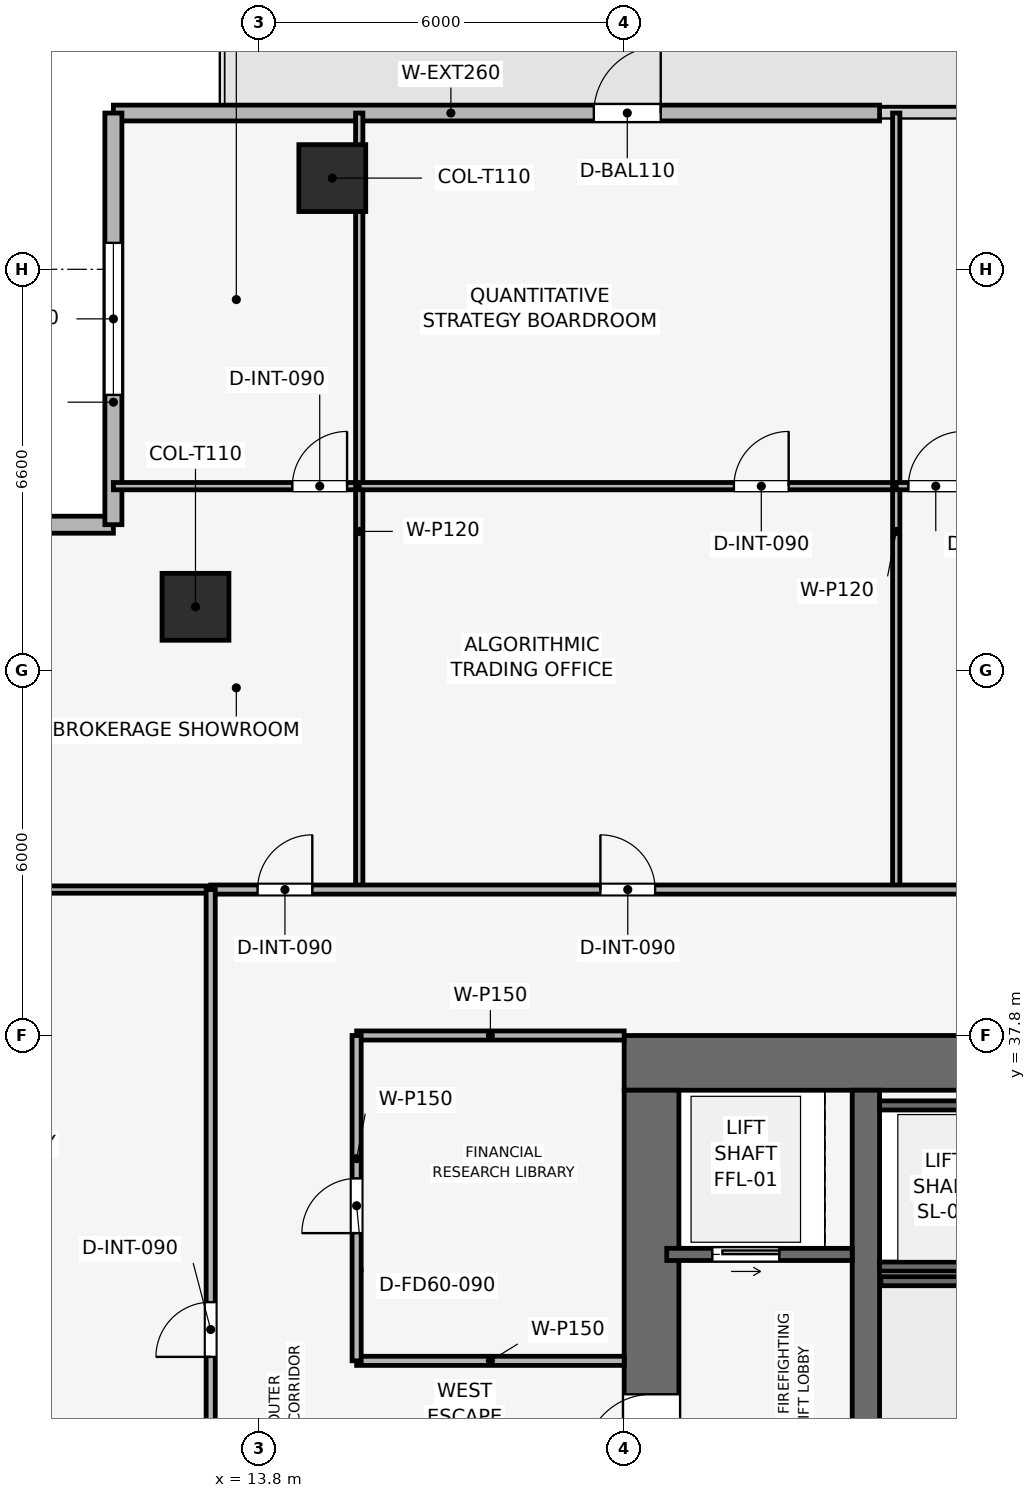
"""IFC4 building model, lengths in metres.
Left out: names, types, materials, properties, quantities, classifications, styles, units other than length and angle.
Written with IfcOpenShell. Run it as: python <this file> out.ifc"""

import sys

from ifc_helpers import new_model, si_unit, direction, frame, frame_2d, origin, origin_2d, place, context, subcontext, project, spatial, rectangle, extrude, element, fill, save


model = new_model("IFC4")
c1 = context("Model", 3, precision=1e-05, world=origin(), true_north=direction((0.0, 1.0)))
c2 = subcontext(c1, "Body", "Model", "MODEL_VIEW")
j1 = project(units=[si_unit("LENGTHUNIT", "METRE"), si_unit("PLANEANGLEUNIT", "RADIAN")], contexts=[c1])
p1 = place(None, origin())
s1 = spatial("IfcSite", under=j1, at=p1, CompositionType="ELEMENT")
p2 = place(p1, origin())
s2 = spatial("IfcBuilding", under=s1, at=p2, CompositionType="ELEMENT")
p3 = place(p2, frame((0.0, 0.0, 164.55)))
s3 = spatial("IfcBuildingStorey", under=s2, at=p3, CompositionType="ELEMENT", Elevation=164.55)
p4 = place(p3, frame((19.8, 37.35, 0.0), z_axis=(0.0, 0.0, 1.0), x_axis=(1.0, 0.0, 0.0)))
e1 = element("IfcWall", 1, at=p4, inside=s3, PredefinedType="SHEAR", context=c2, shape_type="SweptSolid", body=[
    extrude(rectangle(XDim=18.0, YDim=0.9, at=frame_2d((9.0, 0.0))), origin(), (0.0, 0.0, 1.0), 3.75),
])
p5 = place(p4, frame((7.05, 0.0, 0.0)))
e2 = element("IfcOpeningElement", 2, at=p5, cuts=e1, PredefinedType="OPENING", context=c2, shape_type="SweptSolid", body=[
    extrude(rectangle(XDim=1.1, YDim=2.15, at=frame_2d((0.55, 1.075))), frame((0.0, 0.46, 0.0), z_axis=(0.0, -1.0, 0.0), x_axis=(1.0, 0.0, 0.0)), (0.0, 0.0, 1.0), 0.92),
])
p6 = place(p3, frame((20.25, 20.7, 0.0), z_axis=(0.0, 0.0, 1.0), x_axis=(0.0, 1.0, 0.0)))
e3 = element("IfcWall", 3, at=p6, inside=s3, PredefinedType="SHEAR", context=c2, shape_type="SweptSolid", body=[
    extrude(rectangle(XDim=16.2, YDim=0.9, at=frame_2d((8.1, 0.0))), origin(), (0.0, 0.0, 1.0), 3.75),
])
p7 = place(p6, frame((10.1, 0.0, 0.0)))
e4 = element("IfcOpeningElement", 4, at=p7, cuts=e3, PredefinedType="OPENING", context=c2, shape_type="SweptSolid", body=[
    extrude(rectangle(XDim=1.1, YDim=2.15, at=frame_2d((0.55, 1.075))), frame((0.0, 0.46, 0.0), z_axis=(0.0, -1.0, 0.0), x_axis=(1.0, 0.0, 0.0)), (0.0, 0.0, 1.0), 0.92),
])
p8 = place(p3, frame((23.775, 20.7, 0.0), z_axis=(0.0, 0.0, 1.0), x_axis=(0.0, 1.0, 0.0)))
e5 = element("IfcWall", 5, at=p8, inside=s3, PredefinedType="SHEAR", context=c2, shape_type="SweptSolid", body=[
    extrude(rectangle(XDim=16.2, YDim=0.45, at=frame_2d((8.1, 0.0))), origin(), (0.0, 0.0, 1.0), 3.75),
])
for number, where, z_axis, x_axis in (
    (6, (15.0, 51.9, 0.003), (0.0, 0.0, 1.0), (1.0, 0.0, 0.0)),
    (7, (12.75, 44.85, 0.003), (0.0, 0.0, 1.0), (1.0, 0.0, 0.0)),
):
    element("IfcColumn", number, at=place(p3, frame(where, z_axis=z_axis, x_axis=x_axis)), inside=s3, PredefinedType="COLUMN", context=c2, shape_type="SweptSolid", body=[
        extrude(rectangle(XDim=1.1, YDim=1.1, at=origin_2d()), origin(), (0.0, 0.0, 1.0), 3.489),
    ])
p9 = place(p3, frame((11.4, 52.97, 0.0), z_axis=(0.0, 0.0, 1.0), x_axis=(1.0, 0.0, 0.0)))
e8 = element("IfcWall", 8, at=p9, inside=s3, PredefinedType="SOLIDWALL", context=c2, shape_type="SweptSolid", body=[
    extrude(rectangle(XDim=12.6, YDim=0.26, at=frame_2d((6.3, 0.0))), origin(), (0.0, 0.0, 1.0), 3.495),
])
p10 = place(p9, frame((7.901, 0.0, 0.0)))
e9 = element("IfcOpeningElement", 9, at=p10, cuts=e8, PredefinedType="OPENING", context=c2, shape_type="SweptSolid", body=[
    extrude(rectangle(XDim=1.1, YDim=2.2, at=frame_2d((0.55, 1.1))), frame((0.0, 0.14, 0.0), z_axis=(0.0, -1.0, 0.0), x_axis=(1.0, 0.0, 0.0)), (0.0, 0.0, 1.0), 0.28),
])
p11 = place(p3, frame((4.63, 46.2, 0.0), z_axis=(0.0, 0.0, 1.0), x_axis=(1.0, 0.0, 0.0)))
e10 = element("IfcWall", 10, at=p11, inside=s3, PredefinedType="SOLIDWALL", context=c2, shape_type="SweptSolid", body=[
    extrude(rectangle(XDim=6.77, YDim=0.28, at=frame_2d((3.385, 0.0))), origin(), (0.0, 0.0, 1.0), 3.495),
])
p12 = place(p11, frame((2.135, 0.0, 0.9)))
e11 = element("IfcOpeningElement", 11, at=p12, cuts=e10, PredefinedType="OPENING", context=c2, shape_type="SweptSolid", body=[
    extrude(rectangle(XDim=2.5, YDim=1.9, at=frame_2d((1.25, 0.95))), frame((0.0, 0.15, 0.0), z_axis=(0.0, -1.0, 0.0), x_axis=(1.0, 0.0, 0.0)), (0.0, 0.0, 1.0), 0.3),
])
p13 = place(p3, frame((11.4, 46.2, 0.0), z_axis=(0.0, 0.0, 1.0), x_axis=(0.0, 1.0, 0.0)))
e12 = element("IfcWall", 12, at=p13, inside=s3, PredefinedType="SOLIDWALL", context=c2, shape_type="SweptSolid", body=[
    extrude(rectangle(XDim=6.77, YDim=0.28, at=frame_2d((3.385, 0.0))), origin(), (0.0, 0.0, 1.0), 3.495),
])
p14 = place(p13, frame((2.135, 0.0, 0.9)))
e13 = element("IfcOpeningElement", 13, at=p14, cuts=e12, PredefinedType="OPENING", context=c2, shape_type="SweptSolid", body=[
    extrude(rectangle(XDim=2.5, YDim=1.9, at=frame_2d((1.25, 0.95))), frame((0.0, 0.15, 0.0), z_axis=(0.0, -1.0, 0.0), x_axis=(1.0, 0.0, 0.0)), (0.0, 0.0, 1.0), 0.3),
])
p15 = place(p3, frame((20.5, 34.2, 0.0), z_axis=(0.0, 0.0, 1.0), x_axis=(1.0, 0.0, 0.0)))
e14 = element("IfcWall", 14, at=p15, inside=s3, PredefinedType="SHEAR", context=c2, shape_type="SweptSolid", body=[
    extrude(rectangle(XDim=3.05, YDim=0.2, at=frame_2d((1.525, 0.0))), origin(), (0.0, 0.0, 1.0), 3.495),
])
p16 = place(p15, frame((0.75, 0.0, 0.0)))
e15 = element("IfcOpeningElement", 15, at=p16, cuts=e14, PredefinedType="OPENING", context=c2, shape_type="SweptSolid", body=[
    extrude(rectangle(XDim=1.1, YDim=2.15, at=frame_2d((0.55, 1.075))), frame((0.0, 0.11, 0.0), z_axis=(0.0, -1.0, 0.0), x_axis=(1.0, 0.0, 0.0)), (0.0, 0.0, 1.0), 0.22),
])
for number, where, z_axis, x_axis in (
    (16, (24.0, 34.0, 0.0), (0.0, 0.0, 1.0), (1.0, 0.0, 0.0)),
    (17, (24.0, 36.65, 0.0), (0.0, 0.0, 1.0), (1.0, 0.0, 0.0)),
):
    element("IfcWall", number, at=place(p3, frame(where, z_axis=z_axis, x_axis=x_axis)), inside=s3, PredefinedType="SHEAR", context=c2, shape_type="SweptSolid", body=[
        extrude(rectangle(XDim=2.48, YDim=0.15, at=frame_2d((1.24, 0.0))), origin(), (0.0, 0.0, 1.0), 3.495),
    ])
p17 = place(p3, frame((24.02, 33.76, 0.0), z_axis=(0.0, 0.0, 1.0), x_axis=(1.0, 0.0, 0.0)))
e18 = element("IfcWall", 18, at=p17, inside=s3, PredefinedType="SHEAR", context=c2, shape_type="SweptSolid", body=[
    extrude(rectangle(XDim=4.08, YDim=0.15, at=frame_2d((2.04, 0.0))), origin(), (0.0, 0.0, 1.0), 3.495),
])
p18 = place(p3, frame((15.4, 32.45, 0.0), z_axis=(0.0, 0.0, 1.0), x_axis=(1.0, 0.0, 0.0)))
e19 = element("IfcWall", 19, at=p18, inside=s3, PredefinedType="PARTITIONING", context=c2, shape_type="SweptSolid", body=[
    extrude(rectangle(XDim=4.4, YDim=0.15, at=frame_2d((2.2, 0.0))), origin(), (0.0, 0.0, 1.0), 3.495),
])
p19 = place(p3, frame((15.4, 37.8, 0.0), z_axis=(0.0, 0.0, 1.0), x_axis=(1.0, 0.0, 0.0)))
e20 = element("IfcWall", 20, at=p19, inside=s3, PredefinedType="PARTITIONING", context=c2, shape_type="SweptSolid", body=[
    extrude(rectangle(XDim=4.4, YDim=0.15, at=frame_2d((2.2, 0.0))), origin(), (0.0, 0.0, 1.0), 3.03),
])
p20 = place(p3, frame((15.4, 32.45, 0.0), z_axis=(0.0, 0.0, 1.0), x_axis=(0.0, 1.0, 0.0)))
e21 = element("IfcWall", 21, at=p20, inside=s3, PredefinedType="PARTITIONING", context=c2, shape_type="SweptSolid", body=[
    extrude(rectangle(XDim=5.35, YDim=0.15, at=frame_2d((2.675, 0.0))), origin(), (0.0, 0.0, 1.0), 3.03),
])
p21 = place(p20, frame((2.1, 0.0, 0.0)))
e22 = element("IfcOpeningElement", 22, at=p21, cuts=e21, PredefinedType="OPENING", context=c2, shape_type="SweptSolid", body=[
    extrude(rectangle(XDim=0.9, YDim=2.1, at=frame_2d((0.45, 1.05))), frame((0.0, 0.085, 0.0), z_axis=(0.0, -1.0, 0.0), x_axis=(1.0, 0.0, 0.0)), (0.0, 0.0, 1.0), 0.17),
])
p22 = place(p3, frame((11.4, 46.834, 0.0), z_axis=(0.0, 0.0, 1.0), x_axis=(1.0, 0.0, 0.0)))
e23 = element("IfcWall", 23, at=p22, inside=s3, PredefinedType="PARTITIONING", context=c2, shape_type="SweptSolid", body=[
    extrude(rectangle(XDim=4.043, YDim=0.12, at=frame_2d((2.021, 0.0))), origin(), (0.0, 0.0, 1.0), 2.98),
])
p23 = place(p22, frame((2.943, 0.0, 0.0)))
e24 = element("IfcOpeningElement", 24, at=p23, cuts=e23, PredefinedType="OPENING", context=c2, shape_type="SweptSolid", body=[
    extrude(rectangle(XDim=0.9, YDim=2.1, at=frame_2d((0.45, 1.05))), frame((0.0, 0.07, 0.0), z_axis=(0.0, -1.0, 0.0), x_axis=(1.0, 0.0, 0.0)), (0.0, 0.0, 1.0), 0.14),
])
p24 = place(p3, frame((15.443, 40.2, 0.0), z_axis=(0.0, 0.0, 1.0), x_axis=(0.0, 1.0, 0.0)))
e25 = element("IfcWall", 25, at=p24, inside=s3, PredefinedType="PARTITIONING", context=c2, shape_type="SweptSolid", body=[
    extrude(rectangle(XDim=12.77, YDim=0.12, at=frame_2d((6.385, 0.0))), origin(), (0.0, 0.0, 1.0), 2.98),
])
p25 = place(p3, frame((15.443, 46.834, 0.0), z_axis=(0.0, 0.0, 1.0), x_axis=(1.0, 0.0, 0.0)))
e26 = element("IfcWall", 26, at=p25, inside=s3, PredefinedType="PARTITIONING", context=c2, shape_type="SweptSolid", body=[
    extrude(rectangle(XDim=8.831, YDim=0.12, at=frame_2d((4.416, 0.0))), origin(), (0.0, 0.0, 1.0), 3.03),
])
p26 = place(p25, frame((6.162, 0.0, 0.0)))
e27 = element("IfcOpeningElement", 27, at=p26, cuts=e26, PredefinedType="OPENING", context=c2, shape_type="SweptSolid", body=[
    extrude(rectangle(XDim=0.9, YDim=2.1, at=frame_2d((0.45, 1.05))), frame((0.0, 0.07, 0.0), z_axis=(0.0, -1.0, 0.0), x_axis=(1.0, 0.0, 0.0)), (0.0, 0.0, 1.0), 0.14),
])
p27 = place(p3, frame((24.274, 40.2, 0.0), z_axis=(0.0, 0.0, 1.0), x_axis=(0.0, 1.0, 0.0)))
e28 = element("IfcWall", 28, at=p27, inside=s3, PredefinedType="PARTITIONING", context=c2, shape_type="SweptSolid", body=[
    extrude(rectangle(XDim=12.77, YDim=0.12, at=frame_2d((6.385, 0.0))), origin(), (0.0, 0.0, 1.0), 2.98),
])
p28 = place(p3, frame((24.274, 46.834, 0.0), z_axis=(0.0, 0.0, 1.0), x_axis=(1.0, 0.0, 0.0)))
e29 = element("IfcWall", 29, at=p28, inside=s3, PredefinedType="PARTITIONING", context=c2, shape_type="SweptSolid", body=[
    extrude(rectangle(XDim=8.831, YDim=0.12, at=frame_2d((4.416, 0.0))), origin(), (0.0, 0.0, 1.0), 3.03),
])
p29 = place(p28, frame((0.2, 0.0, 0.0)))
e30 = element("IfcOpeningElement", 30, at=p29, cuts=e29, PredefinedType="OPENING", context=c2, shape_type="SweptSolid", body=[
    extrude(rectangle(XDim=0.9, YDim=2.1, at=frame_2d((0.45, 1.05))), frame((0.0, 0.07, 0.0), z_axis=(0.0, -1.0, 0.0), x_axis=(1.0, 0.0, 0.0)), (0.0, 0.0, 1.0), 0.14),
])
p30 = place(p3, frame((4.63, 40.2, 0.0), z_axis=(0.0, 0.0, 1.0), x_axis=(1.0, 0.0, 0.0)))
e31 = element("IfcWall", 31, at=p30, inside=s3, PredefinedType="PARTITIONING", context=c2, shape_type="SweptSolid", body=[
    extrude(rectangle(XDim=8.37, YDim=0.12, at=frame_2d((4.185, 0.0))), origin(), (0.0, 0.0, 1.0), 2.98),
])
p31 = place(p3, frame((13.0, 40.2, 0.0), z_axis=(0.0, 0.0, 1.0), x_axis=(1.0, 0.0, 0.0)))
e32 = element("IfcWall", 32, at=p31, inside=s3, PredefinedType="PARTITIONING", context=c2, shape_type="SweptSolid", body=[
    extrude(rectangle(XDim=31.6, YDim=0.15, at=frame_2d((15.8, 0.0))), origin(), (0.0, 0.0, 1.0), 3.03),
])
p32 = place(p31, frame((0.771, 0.0, 0.0)))
e33 = element("IfcOpeningElement", 33, at=p32, cuts=e32, PredefinedType="OPENING", context=c2, shape_type="SweptSolid", body=[
    extrude(rectangle(XDim=0.9, YDim=2.1, at=frame_2d((0.45, 1.05))), frame((0.0, 0.085, 0.0), z_axis=(0.0, -1.0, 0.0), x_axis=(1.0, 0.0, 0.0)), (0.0, 0.0, 1.0), 0.17),
])
p33 = place(p31, frame((6.409, 0.0, 0.0)))
e34 = element("IfcOpeningElement", 34, at=p33, cuts=e32, PredefinedType="OPENING", context=c2, shape_type="SweptSolid", body=[
    extrude(rectangle(XDim=0.9, YDim=2.1, at=frame_2d((0.45, 1.05))), frame((0.0, 0.085, 0.0), z_axis=(0.0, -1.0, 0.0), x_axis=(1.0, 0.0, 0.0)), (0.0, 0.0, 1.0), 0.17),
])
p34 = place(p31, frame((15.239, 0.0, 0.0)))
e35 = element("IfcOpeningElement", 35, at=p34, cuts=e32, PredefinedType="OPENING", context=c2, shape_type="SweptSolid", body=[
    extrude(rectangle(XDim=0.9, YDim=2.1, at=frame_2d((0.45, 1.05))), frame((0.0, 0.085, 0.0), z_axis=(0.0, -1.0, 0.0), x_axis=(1.0, 0.0, 0.0)), (0.0, 0.0, 1.0), 0.17),
])
p35 = place(p31, frame((25.402, 0.0, 0.0)))
e36 = element("IfcOpeningElement", 36, at=p35, cuts=e32, PredefinedType="OPENING", context=c2, shape_type="SweptSolid", body=[
    extrude(rectangle(XDim=0.9, YDim=2.1, at=frame_2d((0.45, 1.05))), frame((0.0, 0.085, 0.0), z_axis=(0.0, -1.0, 0.0), x_axis=(1.0, 0.0, 0.0)), (0.0, 0.0, 1.0), 0.17),
])
p36 = place(p3, frame((13.0, 17.4, 0.0), z_axis=(0.0, 0.0, 1.0), x_axis=(0.0, 1.0, 0.0)))
e37 = element("IfcWall", 37, at=p36, inside=s3, PredefinedType="PARTITIONING", context=c2, shape_type="SweptSolid", body=[
    extrude(rectangle(XDim=22.8, YDim=0.15, at=frame_2d((11.4, 0.0))), origin(), (0.0, 0.0, 1.0), 3.03),
])
p37 = place(p36, frame((6.115, 0.0, 0.0)))
e38 = element("IfcOpeningElement", 38, at=p37, cuts=e37, PredefinedType="OPENING", context=c2, shape_type="SweptSolid", body=[
    extrude(rectangle(XDim=0.9, YDim=2.1, at=frame_2d((0.45, 1.05))), frame((0.0, 0.085, 0.0), z_axis=(0.0, -1.0, 0.0), x_axis=(1.0, 0.0, 0.0)), (0.0, 0.0, 1.0), 0.17),
])
p38 = place(p36, frame((15.115, 0.0, 0.0)))
e39 = element("IfcOpeningElement", 39, at=p38, cuts=e37, PredefinedType="OPENING", context=c2, shape_type="SweptSolid", body=[
    extrude(rectangle(XDim=0.9, YDim=2.1, at=frame_2d((0.45, 1.05))), frame((0.0, 0.085, 0.0), z_axis=(0.0, -1.0, 0.0), x_axis=(1.0, 0.0, 0.0)), (0.0, 0.0, 1.0), 0.17),
])
p39 = place(p10, origin())
e40 = element("IfcDoor", 40, at=p39, inside=s3, OperationType="SINGLE_SWING_RIGHT", PredefinedType="DOOR", context=c2, shape_type="SweptSolid", body=[
    extrude(rectangle(XDim=1.1, YDim=2.2, at=frame_2d((0.55, 1.1))), frame((0.0, 0.025, 0.0), z_axis=(0.0, -1.0, 0.0), x_axis=(1.0, 0.0, 0.0)), (0.0, 0.0, 1.0), 0.05),
])
fill(e9, e40)
p40 = place(p14, origin())
e41 = element("IfcWindow", 41, at=p40, inside=s3, PartitioningType="SINGLE_PANEL", PredefinedType="WINDOW", context=c2, shape_type="SweptSolid", body=[
    extrude(rectangle(XDim=2.5, YDim=1.9, at=frame_2d((1.25, 0.95))), frame((0.0, 0.03, 0.0), z_axis=(0.0, -1.0, 0.0), x_axis=(1.0, 0.0, 0.0)), (0.0, 0.0, 1.0), 0.06),
])
fill(e13, e41)
p41 = place(p16, origin())
e42 = element("IfcDoor", 42, at=p41, inside=s3, OperationType="SLIDING_TO_RIGHT", PredefinedType="DOOR", context=c2, shape_type="SweptSolid", body=[
    extrude(rectangle(XDim=1.1, YDim=2.15, at=frame_2d((0.55, 1.075))), frame((0.0, 0.025, 0.0), z_axis=(0.0, -1.0, 0.0), x_axis=(1.0, 0.0, 0.0)), (0.0, 0.0, 1.0), 0.05),
])
fill(e15, e42)
p42 = place(p21, origin())
e43 = element("IfcDoor", 43, at=p42, inside=s3, OperationType="SINGLE_SWING_LEFT", PredefinedType="DOOR", context=c2, shape_type="SweptSolid", body=[
    extrude(rectangle(XDim=0.9, YDim=2.1, at=frame_2d((0.45, 1.05))), frame((0.0, 0.025, 0.0), z_axis=(0.0, -1.0, 0.0), x_axis=(1.0, 0.0, 0.0)), (0.0, 0.0, 1.0), 0.05),
])
fill(e22, e43)
p43 = place(p23, origin())
e44 = element("IfcDoor", 44, at=p43, inside=s3, OperationType="SINGLE_SWING_RIGHT", PredefinedType="DOOR", context=c2, shape_type="SweptSolid", body=[
    extrude(rectangle(XDim=0.9, YDim=2.1, at=frame_2d((0.45, 1.05))), frame((0.0, 0.025, 0.0), z_axis=(0.0, -1.0, 0.0), x_axis=(1.0, 0.0, 0.0)), (0.0, 0.0, 1.0), 0.05),
])
fill(e24, e44)
p44 = place(p26, origin())
e45 = element("IfcDoor", 45, at=p44, inside=s3, OperationType="SINGLE_SWING_RIGHT", PredefinedType="DOOR", context=c2, shape_type="SweptSolid", body=[
    extrude(rectangle(XDim=0.9, YDim=2.1, at=frame_2d((0.45, 1.05))), frame((0.0, 0.025, 0.0), z_axis=(0.0, -1.0, 0.0), x_axis=(1.0, 0.0, 0.0)), (0.0, 0.0, 1.0), 0.05),
])
fill(e27, e45)
p45 = place(p29, origin())
e46 = element("IfcDoor", 46, at=p45, inside=s3, OperationType="SINGLE_SWING_RIGHT", PredefinedType="DOOR", context=c2, shape_type="SweptSolid", body=[
    extrude(rectangle(XDim=0.9, YDim=2.1, at=frame_2d((0.45, 1.05))), frame((0.0, 0.025, 0.0), z_axis=(0.0, -1.0, 0.0), x_axis=(1.0, 0.0, 0.0)), (0.0, 0.0, 1.0), 0.05),
])
fill(e30, e46)
p46 = place(p32, origin())
e47 = element("IfcDoor", 47, at=p46, inside=s3, OperationType="SINGLE_SWING_RIGHT", PredefinedType="DOOR", context=c2, shape_type="SweptSolid", body=[
    extrude(rectangle(XDim=0.9, YDim=2.1, at=frame_2d((0.45, 1.05))), frame((0.0, 0.025, 0.0), z_axis=(0.0, -1.0, 0.0), x_axis=(1.0, 0.0, 0.0)), (0.0, 0.0, 1.0), 0.05),
])
fill(e33, e47)
p47 = place(p33, origin())
e48 = element("IfcDoor", 48, at=p47, inside=s3, OperationType="SINGLE_SWING_LEFT", PredefinedType="DOOR", context=c2, shape_type="SweptSolid", body=[
    extrude(rectangle(XDim=0.9, YDim=2.1, at=frame_2d((0.45, 1.05))), frame((0.0, 0.025, 0.0), z_axis=(0.0, -1.0, 0.0), x_axis=(1.0, 0.0, 0.0)), (0.0, 0.0, 1.0), 0.05),
])
fill(e34, e48)
p48 = place(p38, origin())
e49 = element("IfcDoor", 49, at=p48, inside=s3, OperationType="SINGLE_SWING_LEFT", PredefinedType="DOOR", context=c2, shape_type="SweptSolid", body=[
    extrude(rectangle(XDim=0.9, YDim=2.1, at=frame_2d((0.45, 1.05))), frame((0.0, 0.025, 0.0), z_axis=(0.0, -1.0, 0.0), x_axis=(1.0, 0.0, 0.0)), (0.0, 0.0, 1.0), 0.05),
])
fill(e39, e49)
p49 = place(p7, origin())
e50 = element("IfcDoor", 50, at=p49, inside=s3, OperationType="SINGLE_SWING_LEFT", PredefinedType="DOOR", context=c2, shape_type="SweptSolid", body=[
    extrude(rectangle(XDim=1.1, YDim=2.15, at=frame_2d((0.55, 1.075))), frame((0.0, 0.025, 0.0), z_axis=(0.0, -1.0, 0.0), x_axis=(1.0, 0.0, 0.0)), (0.0, 0.0, 1.0), 0.05),
])
fill(e4, e50)
save(model, sys.argv[1])
